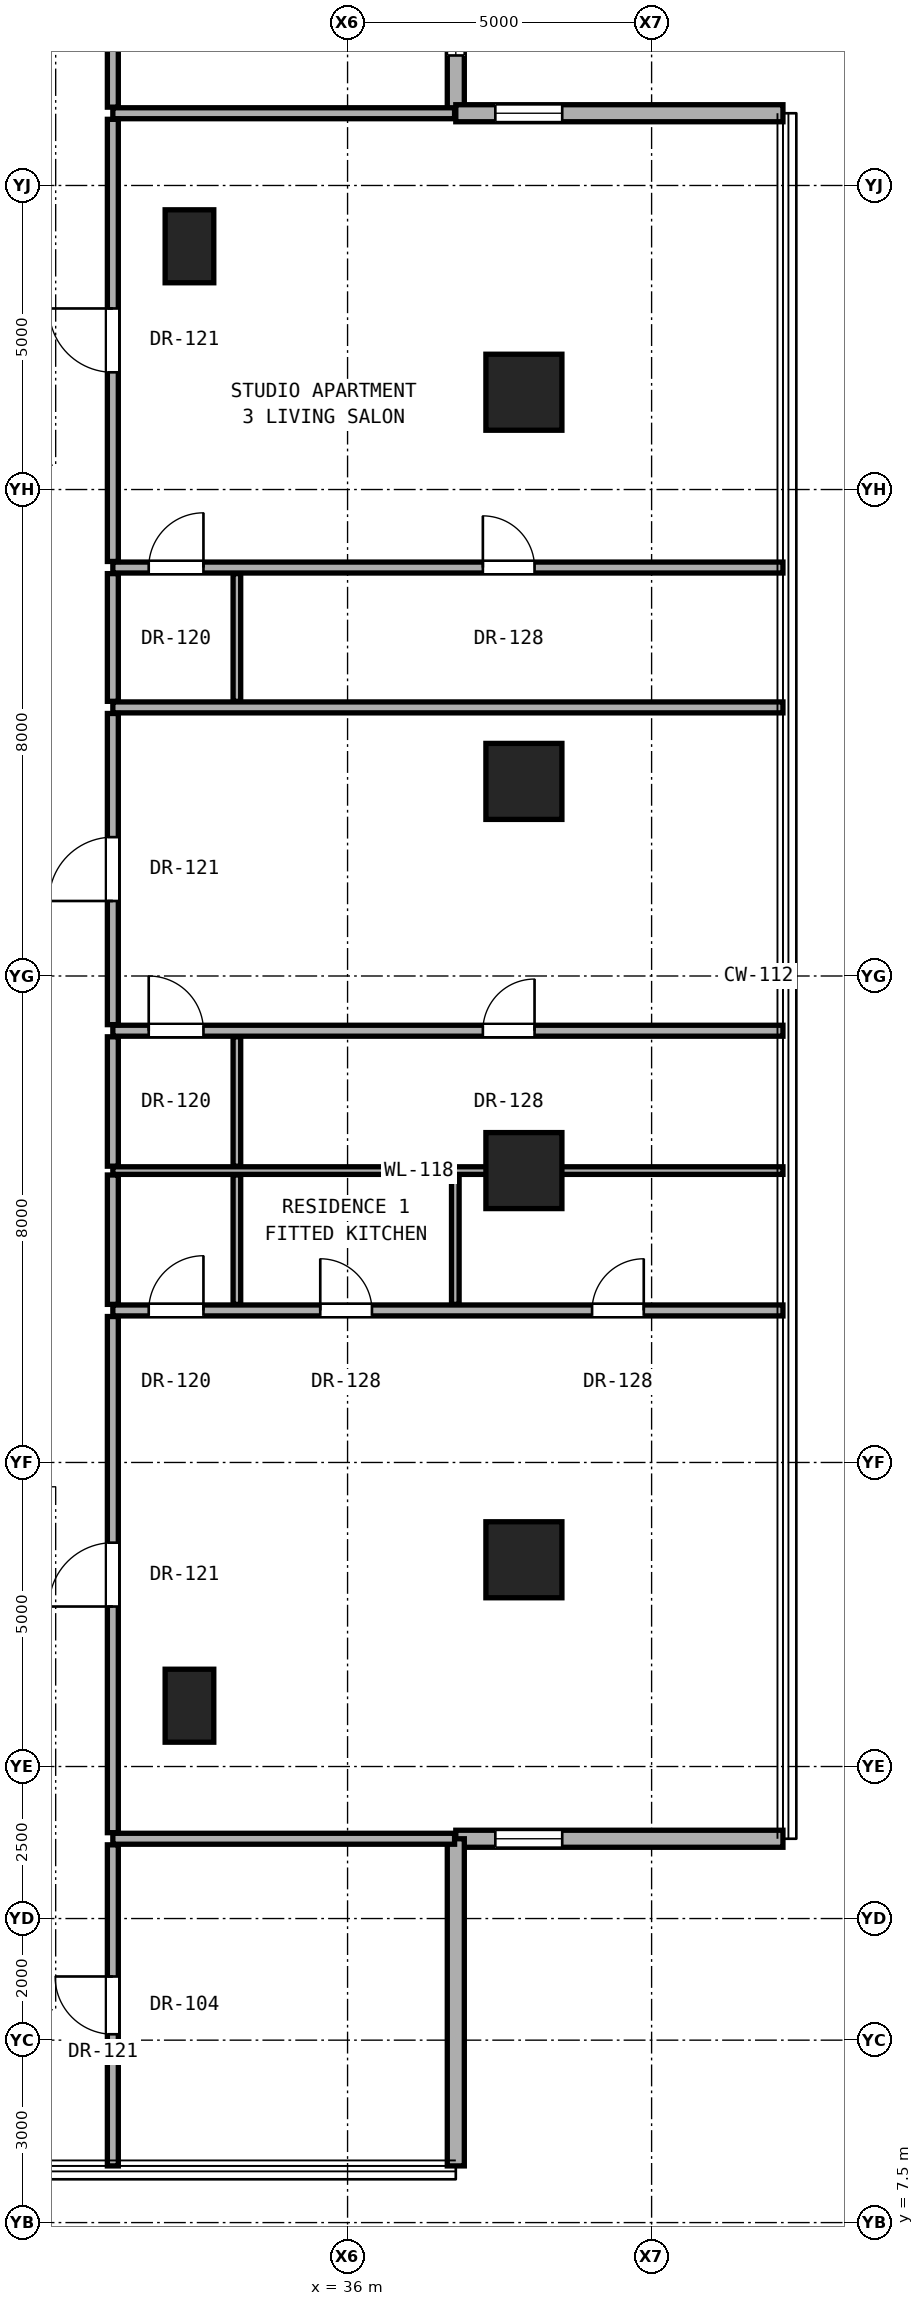
"""IFC4 building model, lengths in metres.
Left out: names, types, materials, properties, quantities, classifications, styles, units other than length and angle.
Written with IfcOpenShell. Run it as: python <this file> out.ifc"""

import sys

from ifc_helpers import new_model, si_unit, direction, frame, frame_2d, origin, origin_2d, place, context, subcontext, project, spatial, rectangle, hollow_rectangle, extrude, element, fill, save


model = new_model("IFC4")
c1 = context("Model", 3, precision=1e-05, world=origin(), true_north=direction((0.0, 1.0)))
c2 = subcontext(c1, "Body", "Model", "MODEL_VIEW")
j1 = project(units=[si_unit("LENGTHUNIT", "METRE"), si_unit("PLANEANGLEUNIT", "RADIAN")], contexts=[c1])
p1 = place(None, origin())
s1 = spatial("IfcSite", under=j1, at=p1, CompositionType="ELEMENT")
p2 = place(p1, origin())
s2 = spatial("IfcBuilding", under=s1, at=p2, CompositionType="ELEMENT")
p3 = place(p2, frame((0.0, 0.0, 42.2)))
s3 = spatial("IfcBuildingStorey", under=s2, at=p3, CompositionType="ELEMENT", Elevation=42.2)
for number, where, z_axis, x_axis in (
    (1, (38.9, 18.4, 0.0), (0.0, 0.0, 1.0), (1.0, 0.0, 0.0)),
    (2, (38.9, 24.8, 0.0), (0.0, 0.0, 1.0), (1.0, 0.0, 0.0)),
    (3, (38.9, 31.2, 0.0), (0.0, 0.0, 1.0), (1.0, 0.0, 0.0)),
    (4, (38.9, 37.6, 0.0), (0.0, 0.0, 1.0), (1.0, 0.0, 0.0)),
):
    element("IfcColumn", number, at=place(p3, frame(where, z_axis=z_axis, x_axis=x_axis)), inside=s3, PredefinedType="COLUMN", context=c2, shape_type="SweptSolid", body=[
        extrude(hollow_rectangle(XDim=1.25, YDim=1.25, WallThickness=0.07, at=origin_2d()), origin(), (0.0, 0.0, 1.0), 3.3),
    ])
for number, where, z_axis, x_axis in (
    (5, (33.4, 16.0, 0.0), (0.0, 0.0, 1.0), (1.0, 0.0, 0.0)),
    (6, (33.4, 40.0, 0.0), (0.0, 0.0, 1.0), (1.0, 0.0, 0.0)),
):
    element("IfcColumn", number, at=place(p3, frame(where, z_axis=z_axis, x_axis=x_axis)), inside=s3, PredefinedType="PILASTER", context=c2, shape_type="SweptSolid", body=[
        extrude(rectangle(XDim=0.8, YDim=1.2, at=origin_2d()), origin(), (0.0, 0.0, 1.0), 3.3),
    ])
p4 = place(p3, frame((37.78, 42.188, 0.0), z_axis=(0.0, 0.0, 1.0), x_axis=(0.0, 1.0, 0.0)))
e7 = element("IfcWall", 7, at=p4, inside=s3, PredefinedType="SOLIDWALL", context=c2, shape_type="SweptSolid", body=[
    extrude(rectangle(XDim=5.38, YDim=0.28, at=frame_2d((2.69, 0.0))), origin(), (0.0, 0.0, 1.0), 3.04),
])
p5 = place(p4, frame((0.95, 0.0, 0.85)))
e8 = element("IfcOpeningElement", 8, at=p5, cuts=e7, PredefinedType="OPENING", context=c2, shape_type="SweptSolid", body=[
    extrude(rectangle(XDim=1.1, YDim=2.0, at=frame_2d((0.55, 1.0))), frame((0.0, 0.15, 0.0), z_axis=(0.0, -1.0, 0.0), x_axis=(1.0, 0.0, 0.0)), (0.0, 0.0, 1.0), 0.3),
])
p6 = place(p3, frame((37.78, 13.812, 0.0), z_axis=(0.0, 0.0, 1.0), x_axis=(1.0, 0.0, 0.0)))
e9 = element("IfcWall", 9, at=p6, inside=s3, PredefinedType="SOLIDWALL", context=c2, shape_type="SweptSolid", body=[
    extrude(rectangle(XDim=5.38, YDim=0.28, at=frame_2d((2.69, 0.0))), origin(), (0.0, 0.0, 1.0), 3.04),
])
p7 = place(p6, frame((0.65, 0.0, 0.85)))
e10 = element("IfcOpeningElement", 10, at=p7, cuts=e9, PredefinedType="OPENING", context=c2, shape_type="SweptSolid", body=[
    extrude(rectangle(XDim=1.1, YDim=2.0, at=frame_2d((0.55, 1.0))), frame((0.0, 0.15, 0.0), z_axis=(0.0, -1.0, 0.0), x_axis=(1.0, 0.0, 0.0)), (0.0, 0.0, 1.0), 0.3),
])
p8 = place(p3, frame((37.78, 8.432, 0.0), z_axis=(0.0, 0.0, 1.0), x_axis=(0.0, 1.0, 0.0)))
e11 = element("IfcWall", 11, at=p8, inside=s3, PredefinedType="SOLIDWALL", context=c2, shape_type="SweptSolid", body=[
    extrude(rectangle(XDim=5.38, YDim=0.28, at=frame_2d((2.69, 0.0))), origin(), (0.0, 0.0, 1.0), 3.04),
])
p9 = place(p3, frame((43.16, 42.188, 0.0), z_axis=(0.0, 0.0, 1.0), x_axis=(-1.0, 0.0, 0.0)))
e12 = element("IfcWall", 12, at=p9, inside=s3, PredefinedType="SOLIDWALL", context=c2, shape_type="SweptSolid", body=[
    extrude(rectangle(XDim=5.38, YDim=0.28, at=frame_2d((2.69, 0.0))), origin(), (0.0, 0.0, 1.0), 3.04),
])
p10 = place(p9, frame((3.63, 0.0, 0.85)))
e13 = element("IfcOpeningElement", 13, at=p10, cuts=e12, PredefinedType="OPENING", context=c2, shape_type="SweptSolid", body=[
    extrude(rectangle(XDim=1.1, YDim=2.0, at=frame_2d((0.55, 1.0))), frame((0.0, 0.15, 0.0), z_axis=(0.0, -1.0, 0.0), x_axis=(1.0, 0.0, 0.0)), (0.0, 0.0, 1.0), 0.3),
])
p11 = place(p3, frame((32.14, 13.812, 0.0), z_axis=(0.0, 0.0, 1.0), x_axis=(1.0, 0.0, 0.0)))
e14 = element("IfcWall", 14, at=p11, inside=s3, PredefinedType="PARTITIONING", context=c2, shape_type="SweptSolid", body=[
    extrude(rectangle(XDim=5.62, YDim=0.18, at=frame_2d((2.81, 0.0))), origin(), (0.0, 0.0, 1.0), 3.06),
])
p12 = place(p3, frame((32.14, 22.5, 0.0), z_axis=(0.0, 0.0, 1.0), x_axis=(1.0, 0.0, 0.0)))
e15 = element("IfcWall", 15, at=p12, inside=s3, PredefinedType="PARTITIONING", context=c2, shape_type="SweptSolid", body=[
    extrude(rectangle(XDim=11.02, YDim=0.18, at=frame_2d((5.51, 0.0))), origin(), (0.0, 0.0, 1.0), 2.125),
])
p13 = place(p12, frame((7.881, 0.0, 0.0)))
e16 = element("IfcOpeningElement", 16, at=p13, cuts=e15, PredefinedType="OPENING", context=c2, shape_type="SweptSolid", body=[
    extrude(rectangle(XDim=0.85, YDim=2.01, at=frame_2d((0.425, 1.005))), frame((0.0, 0.1, 0.0), z_axis=(0.0, -1.0, 0.0), x_axis=(1.0, 0.0, 0.0)), (0.0, 0.0, 1.0), 0.2),
])
p14 = place(p12, frame((3.411, 0.0, 0.0)))
e17 = element("IfcOpeningElement", 17, at=p14, cuts=e15, PredefinedType="OPENING", context=c2, shape_type="SweptSolid", body=[
    extrude(rectangle(XDim=0.85, YDim=2.01, at=frame_2d((0.425, 1.005))), frame((0.0, 0.1, 0.0), z_axis=(0.0, -1.0, 0.0), x_axis=(1.0, 0.0, 0.0)), (0.0, 0.0, 1.0), 0.2),
])
p15 = place(p12, frame((0.59, 0.0, 0.0)))
e18 = element("IfcOpeningElement", 18, at=p15, cuts=e15, PredefinedType="OPENING", context=c2, shape_type="SweptSolid", body=[
    extrude(rectangle(XDim=0.9, YDim=2.1, at=frame_2d((0.45, 1.05))), frame((0.0, 0.1, 0.0), z_axis=(0.0, -1.0, 0.0), x_axis=(1.0, 0.0, 0.0)), (0.0, 0.0, 1.0), 0.2),
])
p16 = place(p3, frame((32.14, 24.8, 0.0), z_axis=(0.0, 0.0, 1.0), x_axis=(1.0, 0.0, 0.0)))
e19 = element("IfcWall", 19, at=p16, inside=s3, PredefinedType="PARTITIONING", context=c2, shape_type="SweptSolid", body=[
    extrude(rectangle(XDim=11.02, YDim=0.125, at=frame_2d((5.51, 0.0))), origin(), (0.0, 0.0, 1.0), 2.125),
])
p17 = place(p3, frame((32.14, 27.1, 0.0), z_axis=(0.0, 0.0, 1.0), x_axis=(1.0, 0.0, 0.0)))
e20 = element("IfcWall", 20, at=p17, inside=s3, PredefinedType="PARTITIONING", context=c2, shape_type="SweptSolid", body=[
    extrude(rectangle(XDim=11.02, YDim=0.18, at=frame_2d((5.51, 0.0))), origin(), (0.0, 0.0, 1.0), 2.125),
])
p18 = place(p17, frame((6.085, 0.0, 0.0)))
e21 = element("IfcOpeningElement", 21, at=p18, cuts=e20, PredefinedType="OPENING", context=c2, shape_type="SweptSolid", body=[
    extrude(rectangle(XDim=0.85, YDim=2.01, at=frame_2d((0.425, 1.005))), frame((0.0, 0.1, 0.0), z_axis=(0.0, -1.0, 0.0), x_axis=(1.0, 0.0, 0.0)), (0.0, 0.0, 1.0), 0.2),
])
p19 = place(p17, frame((0.59, 0.0, 0.0)))
e22 = element("IfcOpeningElement", 22, at=p19, cuts=e20, PredefinedType="OPENING", context=c2, shape_type="SweptSolid", body=[
    extrude(rectangle(XDim=0.9, YDim=2.1, at=frame_2d((0.45, 1.05))), frame((0.0, 0.1, 0.0), z_axis=(0.0, -1.0, 0.0), x_axis=(1.0, 0.0, 0.0)), (0.0, 0.0, 1.0), 0.2),
])
p20 = place(p3, frame((32.14, 32.417, 0.0), z_axis=(0.0, 0.0, 1.0), x_axis=(1.0, 0.0, 0.0)))
e23 = element("IfcWall", 23, at=p20, inside=s3, PredefinedType="PARTITIONING", context=c2, shape_type="SweptSolid", body=[
    extrude(rectangle(XDim=11.02, YDim=0.18, at=frame_2d((5.51, 0.0))), origin(), (0.0, 0.0, 1.0), 2.125),
])
p21 = place(p3, frame((32.14, 34.717, 0.0), z_axis=(0.0, 0.0, 1.0), x_axis=(1.0, 0.0, 0.0)))
e24 = element("IfcWall", 24, at=p21, inside=s3, PredefinedType="PARTITIONING", context=c2, shape_type="SweptSolid", body=[
    extrude(rectangle(XDim=11.02, YDim=0.18, at=frame_2d((5.51, 0.0))), origin(), (0.0, 0.0, 1.0), 2.125),
])
p22 = place(p21, frame((6.085, 0.0, 0.0)))
e25 = element("IfcOpeningElement", 25, at=p22, cuts=e24, PredefinedType="OPENING", context=c2, shape_type="SweptSolid", body=[
    extrude(rectangle(XDim=0.85, YDim=2.01, at=frame_2d((0.425, 1.005))), frame((0.0, 0.1, 0.0), z_axis=(0.0, -1.0, 0.0), x_axis=(1.0, 0.0, 0.0)), (0.0, 0.0, 1.0), 0.2),
])
p23 = place(p21, frame((0.59, 0.0, 0.0)))
e26 = element("IfcOpeningElement", 26, at=p23, cuts=e24, PredefinedType="OPENING", context=c2, shape_type="SweptSolid", body=[
    extrude(rectangle(XDim=0.9, YDim=2.1, at=frame_2d((0.45, 1.05))), frame((0.0, 0.1, 0.0), z_axis=(0.0, -1.0, 0.0), x_axis=(1.0, 0.0, 0.0)), (0.0, 0.0, 1.0), 0.2),
])
p24 = place(p3, frame((32.14, 42.188, 0.0), z_axis=(0.0, 0.0, 1.0), x_axis=(1.0, 0.0, 0.0)))
e27 = element("IfcWall", 27, at=p24, inside=s3, PredefinedType="PARTITIONING", context=c2, shape_type="SweptSolid", body=[
    extrude(rectangle(XDim=5.62, YDim=0.18, at=frame_2d((2.81, 0.0))), origin(), (0.0, 0.0, 1.0), 3.06),
])
p25 = place(p3, frame((32.14, 8.432, 0.0), z_axis=(0.0, 0.0, 1.0), x_axis=(0.0, 1.0, 0.0)))
e28 = element("IfcWall", 28, at=p25, inside=s3, PredefinedType="PARTITIONING", context=c2, shape_type="SweptSolid", body=[
    extrude(rectangle(XDim=5.28, YDim=0.18, at=frame_2d((2.64, 0.0))), origin(), (0.0, 0.0, 1.0), 3.06),
])
p26 = place(p25, frame((2.165, 0.0, 0.0)))
e29 = element("IfcOpeningElement", 29, at=p26, cuts=e28, PredefinedType="OPENING", context=c2, shape_type="SweptSolid", body=[
    extrude(rectangle(XDim=0.95, YDim=2.15, at=frame_2d((0.475, 1.075))), frame((0.0, 0.1, 0.0), z_axis=(0.0, -1.0, 0.0), x_axis=(1.0, 0.0, 0.0)), (0.0, 0.0, 1.0), 0.2),
])
p27 = place(p3, frame((32.14, 13.912, 0.0), z_axis=(0.0, 0.0, 1.0), x_axis=(0.0, 1.0, 0.0)))
e30 = element("IfcWall", 30, at=p27, inside=s3, PredefinedType="PARTITIONING", context=c2, shape_type="SweptSolid", body=[
    extrude(rectangle(XDim=8.488, YDim=0.18, at=frame_2d((4.244, 0.0))), origin(), (0.0, 0.0, 1.0), 2.436),
])
p28 = place(p27, frame((3.719, 0.0, 0.0)))
e31 = element("IfcOpeningElement", 31, at=p28, cuts=e30, PredefinedType="OPENING", context=c2, shape_type="SweptSolid", body=[
    extrude(rectangle(XDim=1.05, YDim=2.2, at=frame_2d((0.525, 1.1))), frame((0.0, 0.1, 0.0), z_axis=(0.0, -1.0, 0.0), x_axis=(1.0, 0.0, 0.0)), (0.0, 0.0, 1.0), 0.2),
])
for number, where, z_axis, x_axis in (
    (32, (32.14, 22.6, 0.0), (0.0, 0.0, 1.0), (0.0, 1.0, 0.0)),
    (33, (32.14, 24.873, 0.0), (0.0, 0.0, 1.0), (0.0, 1.0, 0.0)),
):
    element("IfcWall", number, at=place(p3, frame(where, z_axis=z_axis, x_axis=x_axis)), inside=s3, PredefinedType="PARTITIONING", context=c2, shape_type="SweptSolid", body=[
        extrude(rectangle(XDim=2.127, YDim=0.18, at=frame_2d((1.064, 0.0))), origin(), (0.0, 0.0, 1.0), 2.279),
    ])
p29 = place(p3, frame((32.14, 27.2, 0.0), z_axis=(0.0, 0.0, 1.0), x_axis=(0.0, 1.0, 0.0)))
e34 = element("IfcWall", 34, at=p29, inside=s3, PredefinedType="PARTITIONING", context=c2, shape_type="SweptSolid", body=[
    extrude(rectangle(XDim=5.117, YDim=0.18, at=frame_2d((2.559, 0.0))), origin(), (0.0, 0.0, 1.0), 2.279),
])
p30 = place(p29, frame((2.033, 0.0, 0.0)))
e35 = element("IfcOpeningElement", 35, at=p30, cuts=e34, PredefinedType="OPENING", context=c2, shape_type="SweptSolid", body=[
    extrude(rectangle(XDim=1.05, YDim=2.2, at=frame_2d((0.525, 1.1))), frame((0.0, 0.1, 0.0), z_axis=(0.0, -1.0, 0.0), x_axis=(1.0, 0.0, 0.0)), (0.0, 0.0, 1.0), 0.2),
])
p31 = place(p3, frame((32.14, 32.517, 0.0), z_axis=(0.0, 0.0, 1.0), x_axis=(0.0, 1.0, 0.0)))
e36 = element("IfcWall", 36, at=p31, inside=s3, PredefinedType="PARTITIONING", context=c2, shape_type="SweptSolid", body=[
    extrude(rectangle(XDim=2.1, YDim=0.18, at=frame_2d((1.05, 0.0))), origin(), (0.0, 0.0, 1.0), 3.06),
])
p32 = place(p3, frame((32.14, 34.817, 0.0), z_axis=(0.0, 0.0, 1.0), x_axis=(0.0, 1.0, 0.0)))
e37 = element("IfcWall", 37, at=p32, inside=s3, PredefinedType="PARTITIONING", context=c2, shape_type="SweptSolid", body=[
    extrude(rectangle(XDim=7.271, YDim=0.18, at=frame_2d((3.635, 0.0))), origin(), (0.0, 0.0, 1.0), 2.436),
])
p33 = place(p32, frame((3.111, 0.0, 0.0)))
e38 = element("IfcOpeningElement", 38, at=p33, cuts=e37, PredefinedType="OPENING", context=c2, shape_type="SweptSolid", body=[
    extrude(rectangle(XDim=1.05, YDim=2.2, at=frame_2d((0.525, 1.1))), frame((0.0, 0.1, 0.0), z_axis=(0.0, -1.0, 0.0), x_axis=(1.0, 0.0, 0.0)), (0.0, 0.0, 1.0), 0.2),
])
p34 = place(p3, frame((32.14, 42.288, 0.0), z_axis=(0.0, 0.0, 1.0), x_axis=(0.0, 1.0, 0.0)))
e39 = element("IfcWall", 39, at=p34, inside=s3, PredefinedType="PARTITIONING", context=c2, shape_type="SweptSolid", body=[
    extrude(rectangle(XDim=5.28, YDim=0.18, at=frame_2d((2.64, 0.0))), origin(), (0.0, 0.0, 1.0), 3.06),
])
p35 = place(p34, frame((2.165, 0.0, 0.0)))
e40 = element("IfcOpeningElement", 40, at=p35, cuts=e39, PredefinedType="OPENING", context=c2, shape_type="SweptSolid", body=[
    extrude(rectangle(XDim=0.95, YDim=2.15, at=frame_2d((0.475, 1.075))), frame((0.0, 0.1, 0.0), z_axis=(0.0, -1.0, 0.0), x_axis=(1.0, 0.0, 0.0)), (0.0, 0.0, 1.0), 0.2),
])
for number, where, z_axis, x_axis in (
    (41, (34.18, 22.6, 0.0), (0.0, 0.0, 1.0), (0.0, 1.0, 0.0)),
    (42, (34.18, 24.873, 0.0), (0.0, 0.0, 1.0), (0.0, 1.0, 0.0)),
):
    element("IfcWall", number, at=place(p3, frame(where, z_axis=z_axis, x_axis=x_axis)), inside=s3, PredefinedType="PARTITIONING", context=c2, shape_type="SweptSolid", body=[
        extrude(rectangle(XDim=2.127, YDim=0.125, at=frame_2d((1.064, 0.0))), origin(), (0.0, 0.0, 1.0), 2.279),
    ])
p36 = place(p3, frame((34.18, 32.517, 0.0), z_axis=(0.0, 0.0, 1.0), x_axis=(0.0, 1.0, 0.0)))
e43 = element("IfcWall", 43, at=p36, inside=s3, PredefinedType="PARTITIONING", context=c2, shape_type="SweptSolid", body=[
    extrude(rectangle(XDim=2.1, YDim=0.125, at=frame_2d((1.05, 0.0))), origin(), (0.0, 0.0, 1.0), 3.06),
])
p37 = place(p3, frame((37.772, 22.6, 0.0), z_axis=(0.0, 0.0, 1.0), x_axis=(0.0, 1.0, 0.0)))
e44 = element("IfcWall", 44, at=p37, inside=s3, PredefinedType="PARTITIONING", context=c2, shape_type="SweptSolid", body=[
    extrude(rectangle(XDim=2.127, YDim=0.125, at=frame_2d((1.064, 0.0))), origin(), (0.0, 0.0, 1.0), 2.279),
])
p38 = place(p5, origin())
e45 = element("IfcWindow", 45, at=p38, inside=s3, PartitioningType="SINGLE_PANEL", PredefinedType="WINDOW", context=c2, shape_type="SweptSolid", body=[
    extrude(rectangle(XDim=1.1, YDim=2.0, at=frame_2d((0.55, 1.0))), frame((0.0, 0.03, 0.0), z_axis=(0.0, -1.0, 0.0), x_axis=(1.0, 0.0, 0.0)), (0.0, 0.0, 1.0), 0.06),
])
fill(e8, e45)
p39 = place(p7, origin())
e46 = element("IfcWindow", 46, at=p39, inside=s3, PartitioningType="SINGLE_PANEL", PredefinedType="WINDOW", context=c2, shape_type="SweptSolid", body=[
    extrude(rectangle(XDim=1.1, YDim=2.0, at=frame_2d((0.55, 1.0))), frame((0.0, 0.03, 0.0), z_axis=(0.0, -1.0, 0.0), x_axis=(1.0, 0.0, 0.0)), (0.0, 0.0, 1.0), 0.06),
])
fill(e10, e46)
p40 = place(p10, origin())
e47 = element("IfcWindow", 47, at=p40, inside=s3, PartitioningType="SINGLE_PANEL", PredefinedType="WINDOW", context=c2, shape_type="SweptSolid", body=[
    extrude(rectangle(XDim=1.1, YDim=2.0, at=frame_2d((0.55, 1.0))), frame((0.0, 0.03, 0.0), z_axis=(0.0, -1.0, 0.0), x_axis=(1.0, 0.0, 0.0)), (0.0, 0.0, 1.0), 0.06),
])
fill(e13, e47)
p41 = place(p28, origin())
e48 = element("IfcDoor", 48, at=p41, inside=s3, OperationType="SINGLE_SWING_LEFT", PredefinedType="DOOR", context=c2, shape_type="SweptSolid", body=[
    extrude(rectangle(XDim=1.05, YDim=2.2, at=frame_2d((0.525, 1.1))), frame((0.0, 0.025, 0.0), z_axis=(0.0, -1.0, 0.0), x_axis=(1.0, 0.0, 0.0)), (0.0, 0.0, 1.0), 0.05),
])
fill(e31, e48)
p42 = place(p13, origin())
e49 = element("IfcDoor", 49, at=p42, inside=s3, OperationType="SINGLE_SWING_RIGHT", PredefinedType="DOOR", context=c2, shape_type="SweptSolid", body=[
    extrude(rectangle(XDim=0.85, YDim=2.01, at=frame_2d((0.425, 1.005))), frame((0.0, 0.025, 0.0), z_axis=(0.0, -1.0, 0.0), x_axis=(1.0, 0.0, 0.0)), (0.0, 0.0, 1.0), 0.05),
])
fill(e16, e49)
p43 = place(p14, origin())
e50 = element("IfcDoor", 50, at=p43, inside=s3, OperationType="SINGLE_SWING_LEFT", PredefinedType="DOOR", context=c2, shape_type="SweptSolid", body=[
    extrude(rectangle(XDim=0.85, YDim=2.01, at=frame_2d((0.425, 1.005))), frame((0.0, 0.025, 0.0), z_axis=(0.0, -1.0, 0.0), x_axis=(1.0, 0.0, 0.0)), (0.0, 0.0, 1.0), 0.05),
])
fill(e17, e50)
p44 = place(p15, origin())
e51 = element("IfcDoor", 51, at=p44, inside=s3, OperationType="SINGLE_SWING_RIGHT", PredefinedType="DOOR", context=c2, shape_type="SweptSolid", body=[
    extrude(rectangle(XDim=0.9, YDim=2.1, at=frame_2d((0.45, 1.05))), frame((0.0, 0.025, 0.0), z_axis=(0.0, -1.0, 0.0), x_axis=(1.0, 0.0, 0.0)), (0.0, 0.0, 1.0), 0.05),
])
fill(e18, e51)
p45 = place(p30, origin())
e52 = element("IfcDoor", 52, at=p45, inside=s3, OperationType="SINGLE_SWING_LEFT", PredefinedType="DOOR", context=c2, shape_type="SweptSolid", body=[
    extrude(rectangle(XDim=1.05, YDim=2.2, at=frame_2d((0.525, 1.1))), frame((0.0, 0.025, 0.0), z_axis=(0.0, -1.0, 0.0), x_axis=(1.0, 0.0, 0.0)), (0.0, 0.0, 1.0), 0.05),
])
fill(e35, e52)
p46 = place(p18, origin())
e53 = element("IfcDoor", 53, at=p46, inside=s3, OperationType="SINGLE_SWING_RIGHT", PredefinedType="DOOR", context=c2, shape_type="SweptSolid", body=[
    extrude(rectangle(XDim=0.85, YDim=2.01, at=frame_2d((0.425, 1.005))), frame((0.0, 0.025, 0.0), z_axis=(0.0, -1.0, 0.0), x_axis=(1.0, 0.0, 0.0)), (0.0, 0.0, 1.0), 0.05),
])
fill(e21, e53)
p47 = place(p19, origin())
e54 = element("IfcDoor", 54, at=p47, inside=s3, OperationType="SINGLE_SWING_LEFT", PredefinedType="DOOR", context=c2, shape_type="SweptSolid", body=[
    extrude(rectangle(XDim=0.9, YDim=2.1, at=frame_2d((0.45, 1.05))), frame((0.0, 0.025, 0.0), z_axis=(0.0, -1.0, 0.0), x_axis=(1.0, 0.0, 0.0)), (0.0, 0.0, 1.0), 0.05),
])
fill(e22, e54)
p48 = place(p33, origin())
e55 = element("IfcDoor", 55, at=p48, inside=s3, OperationType="SINGLE_SWING_RIGHT", PredefinedType="DOOR", context=c2, shape_type="SweptSolid", body=[
    extrude(rectangle(XDim=1.05, YDim=2.2, at=frame_2d((0.525, 1.1))), frame((0.0, 0.025, 0.0), z_axis=(0.0, -1.0, 0.0), x_axis=(1.0, 0.0, 0.0)), (0.0, 0.0, 1.0), 0.05),
])
fill(e38, e55)
p49 = place(p22, origin())
e56 = element("IfcDoor", 56, at=p49, inside=s3, OperationType="SINGLE_SWING_LEFT", PredefinedType="DOOR", context=c2, shape_type="SweptSolid", body=[
    extrude(rectangle(XDim=0.85, YDim=2.01, at=frame_2d((0.425, 1.005))), frame((0.0, 0.025, 0.0), z_axis=(0.0, -1.0, 0.0), x_axis=(1.0, 0.0, 0.0)), (0.0, 0.0, 1.0), 0.05),
])
fill(e25, e56)
p50 = place(p23, origin())
e57 = element("IfcDoor", 57, at=p50, inside=s3, OperationType="SINGLE_SWING_RIGHT", PredefinedType="DOOR", context=c2, shape_type="SweptSolid", body=[
    extrude(rectangle(XDim=0.9, YDim=2.1, at=frame_2d((0.45, 1.05))), frame((0.0, 0.025, 0.0), z_axis=(0.0, -1.0, 0.0), x_axis=(1.0, 0.0, 0.0)), (0.0, 0.0, 1.0), 0.05),
])
fill(e26, e57)
p51 = place(p26, origin())
e58 = element("IfcDoor", 58, at=p51, inside=s3, OperationType="SINGLE_SWING_RIGHT", PredefinedType="DOOR", context=c2, shape_type="SweptSolid", body=[
    extrude(rectangle(XDim=0.95, YDim=2.15, at=frame_2d((0.475, 1.075))), frame((0.0, 0.025, 0.0), z_axis=(0.0, -1.0, 0.0), x_axis=(1.0, 0.0, 0.0)), (0.0, 0.0, 1.0), 0.05),
])
fill(e29, e58)
save(model, sys.argv[1])
